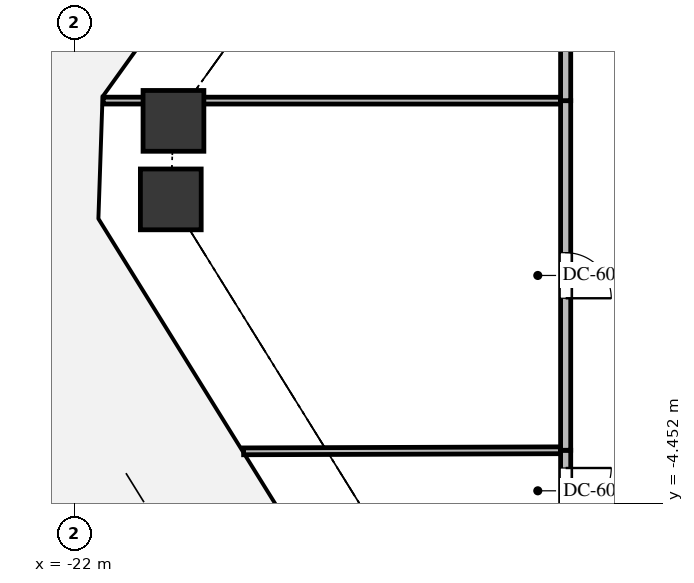
"""IFC4 building model, lengths in metres.
Left out: names, types, materials, properties, quantities, classifications, styles, units other than length and angle.
Written with IfcOpenShell. Run it as: python <this file> out.ifc"""

import sys

from ifc_helpers import new_model, si_unit, direction, frame, frame_2d, origin, origin_2d, place, context, subcontext, project, spatial, rectangle, extrude, source, transform, mapped, element, fill, save


model = new_model("IFC4")
c1 = context("Model", 3, precision=1e-05, world=origin(), true_north=direction((0.0, 1.0)))
c2 = subcontext(c1, "Body", "Model", "MODEL_VIEW")
j1 = project(units=[si_unit("LENGTHUNIT", "METRE"), si_unit("PLANEANGLEUNIT", "RADIAN")], contexts=[c1])
p1 = place(None, origin())
s1 = spatial("IfcSite", under=j1, at=p1, CompositionType="ELEMENT")
p2 = place(p1, origin())
s2 = spatial("IfcBuilding", under=s1, at=p2, CompositionType="ELEMENT")
p3 = place(p2, frame((0.0, 0.0, 88.5)))
s3 = spatial("IfcBuildingStorey", under=s2, at=p3, CompositionType="ELEMENT", Elevation=88.5)
m1 = source(origin(), c2, "Body", "SweptSolid", [
    extrude(rectangle(XDim=1.2, YDim=1.2, at=origin_2d()), origin(), (0.0, 0.0, 1.0), 4.8),
])
for number, where, z_axis, x_axis in (
    (1, (-20.103, 1.542, -0.3), (0.0, 0.0, 1.0), (1.0, 0.0, 0.0)),
    (2, (-20.05, 3.091, -0.3), (0.0, 0.0, 1.0), (1.0, 0.0, 0.0)),
):
    element("IfcColumn", number, at=place(p3, frame(where, z_axis=z_axis, x_axis=x_axis)), inside=s3, PredefinedType="COLUMN", context=c2, shape_type="MappedRepresentation", body=[
        mapped(m1, transform((0.0, 0.0, 0.0), x_axis=(1.0, 0.0, 0.0), y_axis=(0.0, 1.0, 0.0), z_axis=(0.0, 0.0, 1.0), scale=1.0)),
    ])
p4 = place(p3, frame((-13.901, -19.104, 0.0), z_axis=(0.0, 0.0, 1.0), x_axis=(-0.528591126558, 0.848876564009, 0.0)))
e3 = element("IfcWall", 3, at=p4, inside=s3, PredefinedType="PARAPET", context=c2, shape_type="SweptSolid", body=[
    extrude(rectangle(XDim=21.741, YDim=0.22, at=frame_2d((10.871, 0.0))), origin(), (0.0, 0.0, 1.0), 1.2),
])
p5 = place(p3, frame((-25.311, 1.783, 0.0), z_axis=(0.0, 0.0, 1.0), x_axis=(0.584819348165, 0.81116356551, 0.0)))
e4 = element("IfcWall", 4, at=p5, inside=s3, PredefinedType="PARAPET", context=c2, shape_type="SweptSolid", body=[
    extrude(rectangle(XDim=21.441, YDim=0.22, at=frame_2d((10.72, 0.0))), origin(), (0.0, 0.0, 1.0), 1.2),
])
p6 = place(p3, frame((-12.31, -3.41, 0.0), z_axis=(0.0, 0.0, 1.0), x_axis=(0.0, -1.0, 0.0)))
e5 = element("IfcWall", 5, at=p6, inside=s3, PredefinedType="SOLIDWALL", context=c2, shape_type="SweptSolid", body=[
    extrude(rectangle(XDim=6.796, YDim=0.2, at=frame_2d((3.398, 0.0))), origin(), (0.0, 0.0, 1.0), 4.485),
])
p7 = place(p6, frame((0.35, 0.0, 0.0)))
e6 = element("IfcOpeningElement", 6, at=p7, cuts=e5, PredefinedType="OPENING", context=c2, shape_type="SweptSolid", body=[
    extrude(rectangle(XDim=0.9, YDim=2.05, at=frame_2d((0.45, 1.025))), frame((0.0, 0.11, 0.0), z_axis=(0.0, -1.0, 0.0), x_axis=(1.0, 0.0, 0.0)), (0.0, 0.0, 1.0), 0.22),
])
p8 = place(p3, frame((-12.31, 3.49, 0.0), z_axis=(0.0, 0.0, 1.0), x_axis=(0.0, -1.0, 0.0)))
e7 = element("IfcWall", 7, at=p8, inside=s3, PredefinedType="SOLIDWALL", context=c2, shape_type="SweptSolid", body=[
    extrude(rectangle(XDim=6.9, YDim=0.2, at=frame_2d((3.45, 0.0))), origin(), (0.0, 0.0, 1.0), 3.652),
])
p9 = place(p8, frame((3.0, 0.0, 0.0)))
e8 = element("IfcOpeningElement", 8, at=p9, cuts=e7, PredefinedType="OPENING", context=c2, shape_type="SweptSolid", body=[
    extrude(rectangle(XDim=0.9, YDim=2.05, at=frame_2d((0.45, 1.025))), frame((0.0, 0.11, 0.0), z_axis=(0.0, -1.0, 0.0), x_axis=(1.0, 0.0, 0.0)), (0.0, 0.0, 1.0), 0.22),
])
p10 = place(p3, frame((-12.31, 10.206, 0.0), z_axis=(0.0, 0.0, 1.0), x_axis=(0.0, -1.0, 0.0)))
e9 = element("IfcWall", 9, at=p10, inside=s3, PredefinedType="SOLIDWALL", context=c2, shape_type="SweptSolid", body=[
    extrude(rectangle(XDim=6.716, YDim=0.2, at=frame_2d((3.358, 0.0))), origin(), (0.0, 0.0, 1.0), 4.485),
])
p11 = place(p10, frame((0.35, 0.0, 0.0)))
e10 = element("IfcOpeningElement", 10, at=p11, cuts=e9, PredefinedType="OPENING", context=c2, shape_type="SweptSolid", body=[
    extrude(rectangle(XDim=0.9, YDim=2.05, at=frame_2d((0.45, 1.025))), frame((0.0, 0.11, 0.0), z_axis=(0.0, -1.0, 0.0), x_axis=(1.0, 0.0, 0.0)), (0.0, 0.0, 1.0), 0.22),
])
p12 = place(p3, frame((-18.666, -3.431, 0.0), z_axis=(0.0, 0.0, 1.0), x_axis=(0.999994491252, 0.003319256941, 0.0)))
e11 = element("IfcWall", 11, at=p12, inside=s3, PredefinedType="PARTITIONING", context=c2, shape_type="SweptSolid", body=[
    extrude(rectangle(XDim=6.252, YDim=0.135, at=frame_2d((3.126, 0.0))), origin(), (0.0, 0.0, 1.0), 3.82),
])
p13 = place(p3, frame((-21.437, 3.491, 0.0), z_axis=(0.0, 0.0, 1.0), x_axis=(0.999999986823, -0.000162342053, 0.0)))
e12 = element("IfcWall", 12, at=p13, inside=s3, PredefinedType="PARTITIONING", context=c2, shape_type="SweptSolid", body=[
    extrude(rectangle(XDim=9.023, YDim=0.135, at=frame_2d((4.512, 0.0))), origin(), (0.0, 0.0, 1.0), 3.317),
])
p14 = place(p3, frame((0.0, 0.0, -0.28)))
p15 = place(p14, frame((-21.866, -1.915, -0.01)))
p16 = place(p15, frame((0.0, 0.0, 0.24)))
e13 = element("IfcWindow", 13, at=p16, inside=s3, PartitioningType="SINGLE_PANEL", PredefinedType="SKYLIGHT", context=c2, shape_type="SweptSolid", body=[
    extrude(rectangle(XDim=1.2, YDim=1.2, at=origin_2d()), origin(), (0.0, 0.0, 1.0), 0.05),
])
m2 = source(origin(), c2, "Body", "SweptSolid", [
    extrude(rectangle(XDim=0.9, YDim=2.05, at=frame_2d((0.45, 1.025))), frame((0.0, 0.025, 0.0), z_axis=(0.0, -1.0, 0.0), x_axis=(1.0, 0.0, 0.0)), (0.0, 0.0, 1.0), 0.05),
])
p17 = place(p7, origin())
e14 = element("IfcDoor", 14, at=p17, inside=s3, OperationType="SINGLE_SWING_LEFT", PredefinedType="DOOR", context=c2, shape_type="MappedRepresentation", body=[
    mapped(m2, transform((0.0, 0.0, 0.0), x_axis=(1.0, 0.0, 0.0), y_axis=(0.0, 1.0, 0.0), z_axis=(0.0, 0.0, 1.0), scale=1.0)),
])
fill(e6, e14)
m3 = source(origin(), c2, "Body", "SweptSolid", [
    extrude(rectangle(XDim=0.9, YDim=2.05, at=frame_2d((0.45, 1.025))), frame((0.0, 0.025, 0.0), z_axis=(0.0, -1.0, 0.0), x_axis=(1.0, 0.0, 0.0)), (0.0, 0.0, 1.0), 0.05),
])
p18 = place(p9, origin())
e15 = element("IfcDoor", 15, at=p18, inside=s3, OperationType="SINGLE_SWING_RIGHT", PredefinedType="DOOR", context=c2, shape_type="MappedRepresentation", body=[
    mapped(m3, transform((0.0, 0.0, 0.0), x_axis=(1.0, 0.0, 0.0), y_axis=(0.0, 1.0, 0.0), z_axis=(0.0, 0.0, 1.0), scale=1.0)),
])
fill(e8, e15)
save(model, sys.argv[1])
